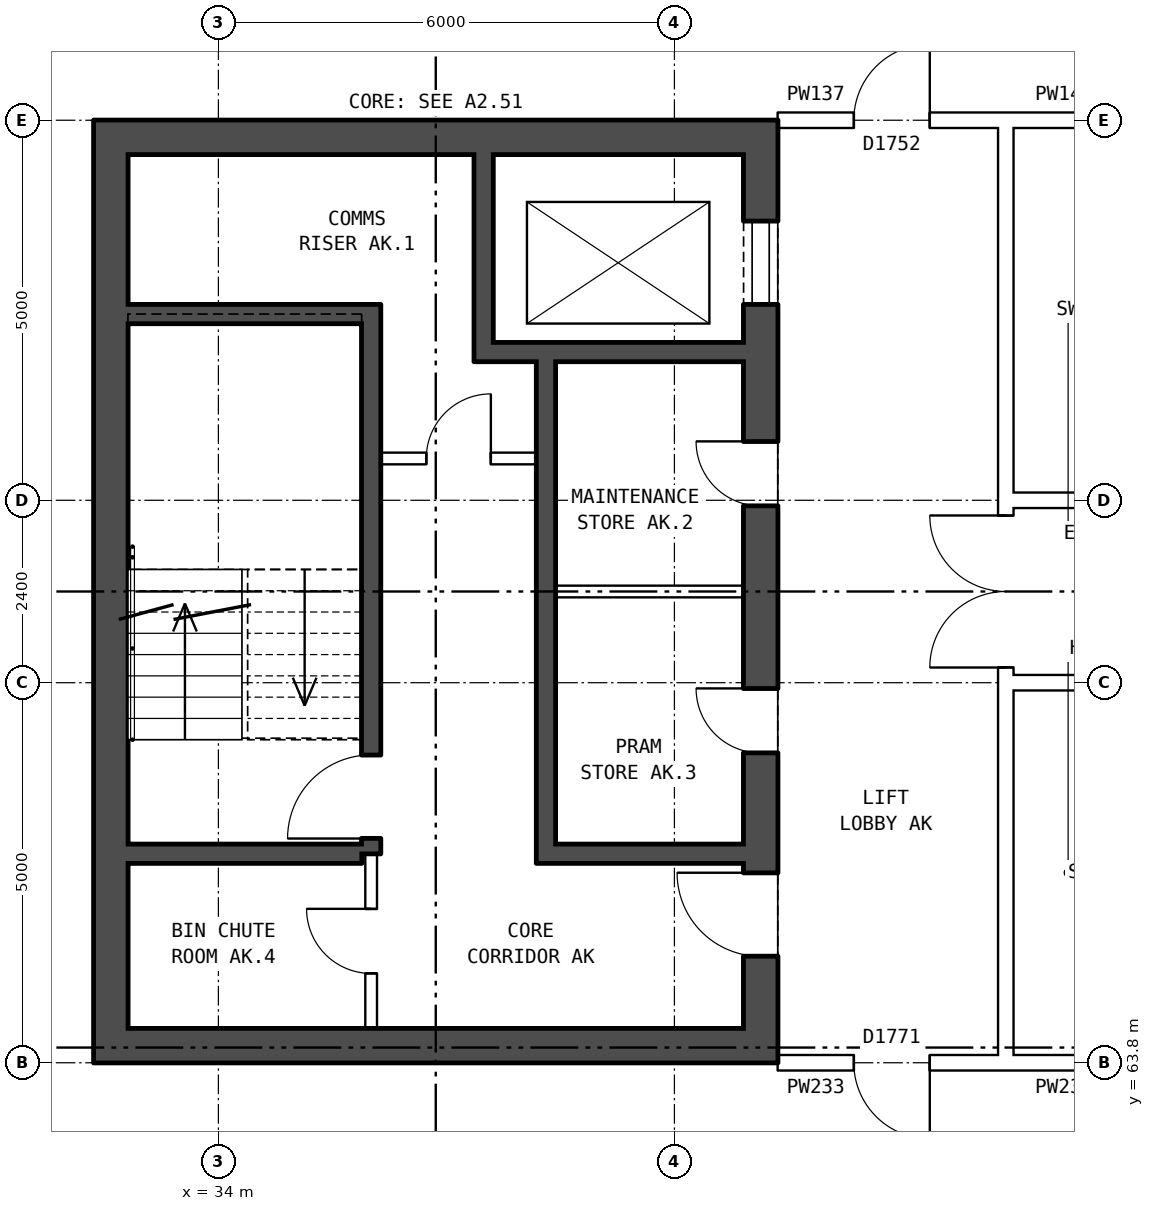
"""IFC4 building model, lengths in metres.
Left out: names, types, materials, properties, quantities, classifications, styles, units other than length and angle.
Written with IfcOpenShell. Run it as: python <this file> out.ifc"""

import sys

from ifc_helpers import new_model, si_unit, direction, frame, frame_2d, origin, place, context, subcontext, project, spatial, rectangle, extrude, element, fill, save


model = new_model("IFC4")
c1 = context("Model", 3, precision=1e-05, world=origin(), true_north=direction((0.0, 1.0)))
c2 = subcontext(c1, "Body", "Model", "MODEL_VIEW")
j1 = project(units=[si_unit("LENGTHUNIT", "METRE"), si_unit("PLANEANGLEUNIT", "RADIAN")], contexts=[c1])
p1 = place(None, origin())
s1 = spatial("IfcSite", under=j1, at=p1, CompositionType="ELEMENT")
p2 = place(p1, origin())
s2 = spatial("IfcBuilding", under=s1, at=p2, CompositionType="ELEMENT")
p3 = place(p2, frame((0.0, 0.0, 178.9)))
s3 = spatial("IfcBuildingStorey", under=s2, at=p3, CompositionType="ELEMENT", Elevation=178.9)
p4 = place(p3, frame((41.135, 76.2, 0.0), z_axis=(0.0, 0.0, 1.0), x_axis=(0.0, -1.0, 0.0)))
e1 = element("IfcWall", 1, at=p4, inside=s3, PredefinedType="SHEAR", context=c2, shape_type="SweptSolid", body=[
    extrude(rectangle(XDim=12.4, YDim=0.45, at=frame_2d((6.2, 0.0))), origin(), (0.0, 0.0, 1.0), 2.85),
])
p5 = place(p4, frame((1.325, 0.0, 0.0)))
e2 = element("IfcOpeningElement", 2, at=p5, cuts=e1, PredefinedType="OPENING", context=c2, shape_type="SweptSolid", body=[
    extrude(rectangle(XDim=1.1, YDim=2.1, at=frame_2d((0.55, 1.05))), frame((0.0, 0.235, 0.0), z_axis=(0.0, -1.0, 0.0), x_axis=(1.0, 0.0, 0.0)), (0.0, 0.0, 1.0), 0.47),
])
p6 = place(p4, frame((4.225, 0.0, 0.0)))
e3 = element("IfcOpeningElement", 3, at=p6, cuts=e1, PredefinedType="OPENING", context=c2, shape_type="SweptSolid", body=[
    extrude(rectangle(XDim=0.85, YDim=2.1, at=frame_2d((0.425, 1.05))), frame((0.0, 0.235, 0.0), z_axis=(0.0, -1.0, 0.0), x_axis=(1.0, 0.0, 0.0)), (0.0, 0.0, 1.0), 0.47),
])
p7 = place(p4, frame((7.475, 0.0, 0.0)))
e4 = element("IfcOpeningElement", 4, at=p7, cuts=e1, PredefinedType="OPENING", context=c2, shape_type="SweptSolid", body=[
    extrude(rectangle(XDim=0.85, YDim=2.1, at=frame_2d((0.425, 1.05))), frame((0.0, 0.235, 0.0), z_axis=(0.0, -1.0, 0.0), x_axis=(1.0, 0.0, 0.0)), (0.0, 0.0, 1.0), 0.47),
])
p8 = place(p4, frame((9.9, 0.0, 0.0)))
e5 = element("IfcOpeningElement", 5, at=p8, cuts=e1, PredefinedType="OPENING", context=c2, shape_type="SweptSolid", body=[
    extrude(rectangle(XDim=1.1, YDim=2.1, at=frame_2d((0.55, 1.05))), frame((0.0, 0.235, 0.0), z_axis=(0.0, -1.0, 0.0), x_axis=(1.0, 0.0, 0.0)), (0.0, 0.0, 1.0), 0.47),
])
p9 = place(p3, frame((32.585, 76.2, 0.0), z_axis=(0.0, 0.0, 1.0), x_axis=(0.0, -1.0, 0.0)))
e6 = element("IfcWall", 6, at=p9, inside=s3, PredefinedType="SHEAR", context=c2, shape_type="SweptSolid", body=[
    extrude(rectangle(XDim=12.4, YDim=0.45, at=frame_2d((6.2, 0.0))), origin(), (0.0, 0.0, 1.0), 2.85),
])
for number, where, z_axis, x_axis in (
    (7, (40.91, 75.975, 0.0), (0.0, 0.0, 1.0), (-1.0, 0.0, 0.0)),
    (8, (40.91, 64.025, 0.0), (0.0, 0.0, 1.0), (-1.0, 0.0, 0.0)),
):
    element("IfcWall", number, at=place(p3, frame(where, z_axis=z_axis, x_axis=x_axis)), inside=s3, PredefinedType="SHEAR", context=c2, shape_type="SweptSolid", body=[
        extrude(rectangle(XDim=8.1, YDim=0.45, at=frame_2d((4.05, 0.0))), origin(), (0.0, 0.0, 1.0), 2.85),
    ])
p10 = place(p3, frame((35.885, 73.65, 0.0), z_axis=(0.0, 0.0, 1.0), x_axis=(-1.0, 0.0, 0.0)))
e9 = element("IfcWall", 9, at=p10, inside=s3, PredefinedType="SHEAR", context=c2, shape_type="SweptSolid", body=[
    extrude(rectangle(XDim=3.075, YDim=0.25, at=frame_2d((1.538, 0.0))), origin(), (0.0, 0.0, 1.0), 2.85),
])
p11 = place(p3, frame((40.91, 73.15, 0.0), z_axis=(0.0, 0.0, 1.0), x_axis=(-1.0, 0.0, 0.0)))
e10 = element("IfcWall", 10, at=p11, inside=s3, PredefinedType="SHEAR", context=c2, shape_type="SweptSolid", body=[
    extrude(rectangle(XDim=3.545, YDim=0.25, at=frame_2d((1.772, 0.0))), origin(), (0.0, 0.0, 1.0), 2.85),
])
p12 = place(p3, frame((38.185, 71.75, 0.0), z_axis=(0.0, 0.0, 1.0), x_axis=(-1.0, 0.0, 0.0)))
e11 = element("IfcWall", 11, at=p12, inside=s3, PredefinedType="PARTITIONING", context=c2, shape_type="SweptSolid", body=[
    extrude(rectangle(XDim=2.05, YDim=0.15, at=frame_2d((1.025, 0.0))), origin(), (0.0, 0.0, 1.0), 2.85),
])
p13 = place(p12, frame((0.6, 0.0, 0.0)))
e12 = element("IfcOpeningElement", 12, at=p13, cuts=e11, PredefinedType="OPENING", context=c2, shape_type="SweptSolid", body=[
    extrude(rectangle(XDim=0.85, YDim=2.1, at=frame_2d((0.425, 1.05))), frame((0.0, 0.085, 0.0), z_axis=(0.0, -1.0, 0.0), x_axis=(1.0, 0.0, 0.0)), (0.0, 0.0, 1.0), 0.17),
])
p14 = place(p3, frame((40.91, 70.0, 0.0), z_axis=(0.0, 0.0, 1.0), x_axis=(-1.0, 0.0, 0.0)))
e13 = element("IfcWall", 13, at=p14, inside=s3, PredefinedType="PARTITIONING", context=c2, shape_type="SweptSolid", body=[
    extrude(rectangle(XDim=2.475, YDim=0.15, at=frame_2d((1.237, 0.0))), origin(), (0.0, 0.0, 1.0), 2.85),
])
p15 = place(p3, frame((40.91, 66.55, 0.0), z_axis=(0.0, 0.0, 1.0), x_axis=(-1.0, 0.0, 0.0)))
e14 = element("IfcWall", 14, at=p15, inside=s3, PredefinedType="SHEAR", context=c2, shape_type="SweptSolid", body=[
    extrude(rectangle(XDim=2.475, YDim=0.25, at=frame_2d((1.237, 0.0))), origin(), (0.0, 0.0, 1.0), 2.85),
])
p16 = place(p3, frame((35.885, 66.55, 0.0), z_axis=(0.0, 0.0, 1.0), x_axis=(-1.0, 0.0, 0.0)))
e15 = element("IfcWall", 15, at=p16, inside=s3, PredefinedType="SHEAR", context=c2, shape_type="SweptSolid", body=[
    extrude(rectangle(XDim=3.075, YDim=0.25, at=frame_2d((1.538, 0.0))), origin(), (0.0, 0.0, 1.0), 2.85),
])
p17 = place(p3, frame((38.31, 73.025, 0.0), z_axis=(0.0, 0.0, 1.0), x_axis=(0.0, -1.0, 0.0)))
e16 = element("IfcWall", 16, at=p17, inside=s3, PredefinedType="SHEAR", context=c2, shape_type="SweptSolid", body=[
    extrude(rectangle(XDim=6.6, YDim=0.25, at=frame_2d((3.3, 0.0))), origin(), (0.0, 0.0, 1.0), 2.85),
])
p18 = place(p3, frame((37.49, 75.75, 0.0), z_axis=(0.0, 0.0, 1.0), x_axis=(0.0, -1.0, 0.0)))
e17 = element("IfcWall", 17, at=p18, inside=s3, PredefinedType="SHEAR", context=c2, shape_type="SweptSolid", body=[
    extrude(rectangle(XDim=2.475, YDim=0.25, at=frame_2d((1.238, 0.0))), origin(), (0.0, 0.0, 1.0), 2.85),
])
p19 = place(p3, frame((36.01, 73.775, 0.0), z_axis=(0.0, 0.0, 1.0), x_axis=(0.0, -1.0, 0.0)))
e18 = element("IfcWall", 18, at=p19, inside=s3, PredefinedType="SHEAR", context=c2, shape_type="SweptSolid", body=[
    extrude(rectangle(XDim=7.225, YDim=0.25, at=frame_2d((3.612, 0.0))), origin(), (0.0, 0.0, 1.0), 2.85),
])
p20 = place(p19, frame((5.925, 0.0, 0.0)))
e19 = element("IfcOpeningElement", 19, at=p20, cuts=e18, PredefinedType="OPENING", context=c2, shape_type="SweptSolid", body=[
    extrude(rectangle(XDim=1.1, YDim=2.1, at=frame_2d((0.55, 1.05))), frame((0.0, 0.135, 0.0), z_axis=(0.0, -1.0, 0.0), x_axis=(1.0, 0.0, 0.0)), (0.0, 0.0, 1.0), 0.27),
])
p21 = place(p3, frame((36.01, 66.55, 0.0), z_axis=(0.0, 0.0, 1.0), x_axis=(0.0, -1.0, 0.0)))
e20 = element("IfcWall", 20, at=p21, inside=s3, PredefinedType="PARTITIONING", context=c2, shape_type="SweptSolid", body=[
    extrude(rectangle(XDim=2.3, YDim=0.15, at=frame_2d((1.15, 0.0))), origin(), (0.0, 0.0, 1.0), 2.85),
])
p22 = place(p21, frame((0.725, 0.0, 0.0)))
e21 = element("IfcOpeningElement", 21, at=p22, cuts=e20, PredefinedType="OPENING", context=c2, shape_type="SweptSolid", body=[
    extrude(rectangle(XDim=0.85, YDim=2.1, at=frame_2d((0.425, 1.05))), frame((0.0, 0.085, 0.0), z_axis=(0.0, -1.0, 0.0), x_axis=(1.0, 0.0, 0.0)), (0.0, 0.0, 1.0), 0.17),
])
p23 = place(p3, frame((44.36, 63.9, 0.0), z_axis=(0.0, 0.0, 1.0), x_axis=(0.0, 1.0, 0.0)))
e22 = element("IfcWall", 22, at=p23, inside=s3, PredefinedType="PARTITIONING", context=c2, shape_type="SweptSolid", body=[
    extrude(rectangle(XDim=12.2, YDim=0.2, at=frame_2d((6.1, 0.0))), origin(), (0.0, 0.0, 1.0), 2.85),
])
p24 = place(p23, frame((5.1, 0.0, 0.0)))
e23 = element("IfcOpeningElement", 23, at=p24, cuts=e22, PredefinedType="OPENING", context=c2, shape_type="SweptSolid", body=[
    extrude(rectangle(XDim=2.0, YDim=2.1, at=frame_2d((1.0, 1.05))), frame((0.0, 0.11, 0.0), z_axis=(0.0, -1.0, 0.0), x_axis=(1.0, 0.0, 0.0)), (0.0, 0.0, 1.0), 0.22),
])
p25 = place(p3, frame((41.36, 63.8, 0.0), z_axis=(0.0, 0.0, 1.0), x_axis=(1.0, 0.0, 0.0)))
e24 = element("IfcWall", 24, at=p25, inside=s3, PredefinedType="PARTITIONING", context=c2, shape_type="SweptSolid", body=[
    extrude(rectangle(XDim=3.0, YDim=0.2, at=frame_2d((1.5, 0.0))), origin(), (0.0, 0.0, 1.0), 2.85),
])
p26 = place(p25, frame((1.0, 0.0, 0.0)))
e25 = element("IfcOpeningElement", 25, at=p26, cuts=e24, PredefinedType="OPENING", context=c2, shape_type="SweptSolid", body=[
    extrude(rectangle(XDim=1.0, YDim=2.1, at=frame_2d((0.5, 1.05))), frame((0.0, 0.11, 0.0), z_axis=(0.0, -1.0, 0.0), x_axis=(1.0, 0.0, 0.0)), (0.0, 0.0, 1.0), 0.22),
])
p27 = place(p3, frame((44.36, 63.8, 0.0), z_axis=(0.0, 0.0, 1.0), x_axis=(1.0, 0.0, 0.0)))
e26 = element("IfcWall", 26, at=p27, inside=s3, PredefinedType="PARTITIONING", context=c2, shape_type="SweptSolid", body=[
    extrude(rectangle(XDim=1.54, YDim=0.2, at=frame_2d((0.77, 0.0))), origin(), (0.0, 0.0, 1.0), 2.85),
])
p28 = place(p3, frame((44.36, 68.8, 0.0), z_axis=(0.0, 0.0, 1.0), x_axis=(1.0, 0.0, 0.0)))
e27 = element("IfcWall", 27, at=p28, inside=s3, PredefinedType="PARTITIONING", context=c2, shape_type="SweptSolid", body=[
    extrude(rectangle(XDim=19.28, YDim=0.2, at=frame_2d((9.64, 0.0))), origin(), (0.0, 0.0, 1.0), 2.85),
])
p29 = place(p28, frame((14.64, 0.0, 0.0)))
e28 = element("IfcOpeningElement", 28, at=p29, cuts=e27, PredefinedType="OPENING", context=c2, shape_type="SweptSolid", body=[
    extrude(rectangle(XDim=1.0, YDim=2.1, at=frame_2d((0.5, 1.05))), frame((0.0, 0.11, 0.0), z_axis=(0.0, -1.0, 0.0), x_axis=(1.0, 0.0, 0.0)), (0.0, 0.0, 1.0), 0.22),
])
p30 = place(p28, frame((11.64, 0.0, 0.0)))
e29 = element("IfcOpeningElement", 29, at=p30, cuts=e27, PredefinedType="OPENING", context=c2, shape_type="SweptSolid", body=[
    extrude(rectangle(XDim=1.0, YDim=2.1, at=frame_2d((0.5, 1.05))), frame((0.0, 0.11, 0.0), z_axis=(0.0, -1.0, 0.0), x_axis=(1.0, 0.0, 0.0)), (0.0, 0.0, 1.0), 0.22),
])
p31 = place(p28, frame((5.64, 0.0, 0.0)))
e30 = element("IfcOpeningElement", 30, at=p31, cuts=e27, PredefinedType="OPENING", context=c2, shape_type="SweptSolid", body=[
    extrude(rectangle(XDim=1.0, YDim=2.1, at=frame_2d((0.5, 1.05))), frame((0.0, 0.11, 0.0), z_axis=(0.0, -1.0, 0.0), x_axis=(1.0, 0.0, 0.0)), (0.0, 0.0, 1.0), 0.22),
])
p32 = place(p3, frame((44.36, 71.2, 0.0), z_axis=(0.0, 0.0, 1.0), x_axis=(1.0, 0.0, 0.0)))
e31 = element("IfcWall", 31, at=p32, inside=s3, PredefinedType="PARTITIONING", context=c2, shape_type="SweptSolid", body=[
    extrude(rectangle(XDim=19.28, YDim=0.2, at=frame_2d((9.64, 0.0))), origin(), (0.0, 0.0, 1.0), 2.85),
])
p33 = place(p32, frame((14.64, 0.0, 0.0)))
e32 = element("IfcOpeningElement", 32, at=p33, cuts=e31, PredefinedType="OPENING", context=c2, shape_type="SweptSolid", body=[
    extrude(rectangle(XDim=1.0, YDim=2.1, at=frame_2d((0.5, 1.05))), frame((0.0, 0.11, 0.0), z_axis=(0.0, -1.0, 0.0), x_axis=(1.0, 0.0, 0.0)), (0.0, 0.0, 1.0), 0.22),
])
p34 = place(p32, frame((5.64, 0.0, 0.0)))
e33 = element("IfcOpeningElement", 33, at=p34, cuts=e31, PredefinedType="OPENING", context=c2, shape_type="SweptSolid", body=[
    extrude(rectangle(XDim=1.0, YDim=2.1, at=frame_2d((0.5, 1.05))), frame((0.0, 0.11, 0.0), z_axis=(0.0, -1.0, 0.0), x_axis=(1.0, 0.0, 0.0)), (0.0, 0.0, 1.0), 0.22),
])
p35 = place(p3, frame((41.36, 76.2, 0.0), z_axis=(0.0, 0.0, 1.0), x_axis=(1.0, 0.0, 0.0)))
e34 = element("IfcWall", 34, at=p35, inside=s3, PredefinedType="PARTITIONING", context=c2, shape_type="SweptSolid", body=[
    extrude(rectangle(XDim=3.0, YDim=0.2, at=frame_2d((1.5, 0.0))), origin(), (0.0, 0.0, 1.0), 2.85),
])
p36 = place(p35, frame((1.0, 0.0, 0.0)))
e35 = element("IfcOpeningElement", 35, at=p36, cuts=e34, PredefinedType="OPENING", context=c2, shape_type="SweptSolid", body=[
    extrude(rectangle(XDim=1.0, YDim=2.1, at=frame_2d((0.5, 1.05))), frame((0.0, 0.11, 0.0), z_axis=(0.0, -1.0, 0.0), x_axis=(1.0, 0.0, 0.0)), (0.0, 0.0, 1.0), 0.22),
])
p37 = place(p3, frame((44.36, 76.2, 0.0), z_axis=(0.0, 0.0, 1.0), x_axis=(1.0, 0.0, 0.0)))
e36 = element("IfcWall", 36, at=p37, inside=s3, PredefinedType="PARTITIONING", context=c2, shape_type="SweptSolid", body=[
    extrude(rectangle(XDim=1.54, YDim=0.2, at=frame_2d((0.77, 0.0))), origin(), (0.0, 0.0, 1.0), 2.85),
])
p38 = place(p5, origin())
e37 = element("IfcDoor", 37, at=p38, inside=s3, OperationType="DOUBLE_DOOR_SLIDING", PredefinedType="DOOR", context=c2, shape_type="SweptSolid", body=[
    extrude(rectangle(XDim=1.1, YDim=2.1, at=frame_2d((0.55, 1.05))), frame((0.0, -0.16, 0.0), z_axis=(0.0, -1.0, 0.0), x_axis=(1.0, 0.0, 0.0)), (0.0, 0.0, 1.0), 0.05),
])
fill(e2, e37)
p39 = place(p6, frame((0.85, 0.0, 0.0), z_axis=(0.0, 0.0, 1.0), x_axis=(-1.0, 0.0, 0.0)))
e38 = element("IfcDoor", 38, at=p39, inside=s3, OperationType="SINGLE_SWING_RIGHT", PredefinedType="DOOR", context=c2, shape_type="SweptSolid", body=[
    extrude(rectangle(XDim=0.85, YDim=2.1, at=frame_2d((0.425, 1.05))), frame((0.0, 0.21, 0.0), z_axis=(0.0, -1.0, 0.0), x_axis=(1.0, 0.0, 0.0)), (0.0, 0.0, 1.0), 0.05),
])
fill(e3, e38)
p40 = place(p7, frame((0.85, 0.0, 0.0), z_axis=(0.0, 0.0, 1.0), x_axis=(-1.0, 0.0, 0.0)))
e39 = element("IfcDoor", 39, at=p40, inside=s3, OperationType="SINGLE_SWING_RIGHT", PredefinedType="DOOR", context=c2, shape_type="SweptSolid", body=[
    extrude(rectangle(XDim=0.85, YDim=2.1, at=frame_2d((0.425, 1.05))), frame((0.0, 0.21, 0.0), z_axis=(0.0, -1.0, 0.0), x_axis=(1.0, 0.0, 0.0)), (0.0, 0.0, 1.0), 0.05),
])
fill(e4, e39)
p41 = place(p8, frame((1.1, 0.0, 0.0), z_axis=(0.0, 0.0, 1.0), x_axis=(-1.0, 0.0, 0.0)))
e40 = element("IfcDoor", 40, at=p41, inside=s3, OperationType="SINGLE_SWING_RIGHT", PredefinedType="DOOR", context=c2, shape_type="SweptSolid", body=[
    extrude(rectangle(XDim=1.1, YDim=2.1, at=frame_2d((0.55, 1.05))), frame((0.0, 0.21, 0.0), z_axis=(0.0, -1.0, 0.0), x_axis=(1.0, 0.0, 0.0)), (0.0, 0.0, 1.0), 0.05),
])
fill(e5, e40)
p42 = place(p20, frame((1.1, 0.0, 0.0), z_axis=(0.0, 0.0, 1.0), x_axis=(-1.0, 0.0, 0.0)))
e41 = element("IfcDoor", 41, at=p42, inside=s3, OperationType="SINGLE_SWING_LEFT", PredefinedType="DOOR", context=c2, shape_type="SweptSolid", body=[
    extrude(rectangle(XDim=1.1, YDim=2.1, at=frame_2d((0.55, 1.05))), frame((0.0, 0.025, 0.0), z_axis=(0.0, -1.0, 0.0), x_axis=(1.0, 0.0, 0.0)), (0.0, 0.0, 1.0), 0.05),
])
fill(e19, e41)
p43 = place(p13, frame((0.85, 0.0, 0.0), z_axis=(0.0, 0.0, 1.0), x_axis=(-1.0, 0.0, 0.0)))
e42 = element("IfcDoor", 42, at=p43, inside=s3, OperationType="SINGLE_SWING_RIGHT", PredefinedType="DOOR", context=c2, shape_type="SweptSolid", body=[
    extrude(rectangle(XDim=0.85, YDim=2.1, at=frame_2d((0.425, 1.05))), frame((0.0, 0.025, 0.0), z_axis=(0.0, -1.0, 0.0), x_axis=(1.0, 0.0, 0.0)), (0.0, 0.0, 1.0), 0.05),
])
fill(e12, e42)
p44 = place(p22, frame((0.85, 0.0, 0.0), z_axis=(0.0, 0.0, 1.0), x_axis=(-1.0, 0.0, 0.0)))
e43 = element("IfcDoor", 43, at=p44, inside=s3, OperationType="SINGLE_SWING_RIGHT", PredefinedType="DOOR", context=c2, shape_type="SweptSolid", body=[
    extrude(rectangle(XDim=0.85, YDim=2.1, at=frame_2d((0.425, 1.05))), frame((0.0, 0.025, 0.0), z_axis=(0.0, -1.0, 0.0), x_axis=(1.0, 0.0, 0.0)), (0.0, 0.0, 1.0), 0.05),
])
fill(e21, e43)
p45 = place(p24, origin())
e44 = element("IfcDoor", 44, at=p45, inside=s3, OperationType="DOUBLE_DOOR_SINGLE_SWING", PredefinedType="DOOR", context=c2, shape_type="SweptSolid", body=[
    extrude(rectangle(XDim=2.0, YDim=2.1, at=frame_2d((1.0, 1.05))), frame((0.0, 0.025, 0.0), z_axis=(0.0, -1.0, 0.0), x_axis=(1.0, 0.0, 0.0)), (0.0, 0.0, 1.0), 0.05),
])
fill(e23, e44)
p46 = place(p26, frame((1.0, 0.0, 0.0), z_axis=(0.0, 0.0, 1.0), x_axis=(-1.0, 0.0, 0.0)))
e45 = element("IfcDoor", 45, at=p46, inside=s3, OperationType="SINGLE_SWING_LEFT", PredefinedType="DOOR", context=c2, shape_type="SweptSolid", body=[
    extrude(rectangle(XDim=1.0, YDim=2.1, at=frame_2d((0.5, 1.05))), frame((0.0, 0.025, 0.0), z_axis=(0.0, -1.0, 0.0), x_axis=(1.0, 0.0, 0.0)), (0.0, 0.0, 1.0), 0.05),
])
fill(e25, e45)
p47 = place(p36, origin())
e46 = element("IfcDoor", 46, at=p47, inside=s3, OperationType="SINGLE_SWING_RIGHT", PredefinedType="DOOR", context=c2, shape_type="SweptSolid", body=[
    extrude(rectangle(XDim=1.0, YDim=2.1, at=frame_2d((0.5, 1.05))), frame((0.0, 0.025, 0.0), z_axis=(0.0, -1.0, 0.0), x_axis=(1.0, 0.0, 0.0)), (0.0, 0.0, 1.0), 0.05),
])
fill(e35, e46)
save(model, sys.argv[1])
